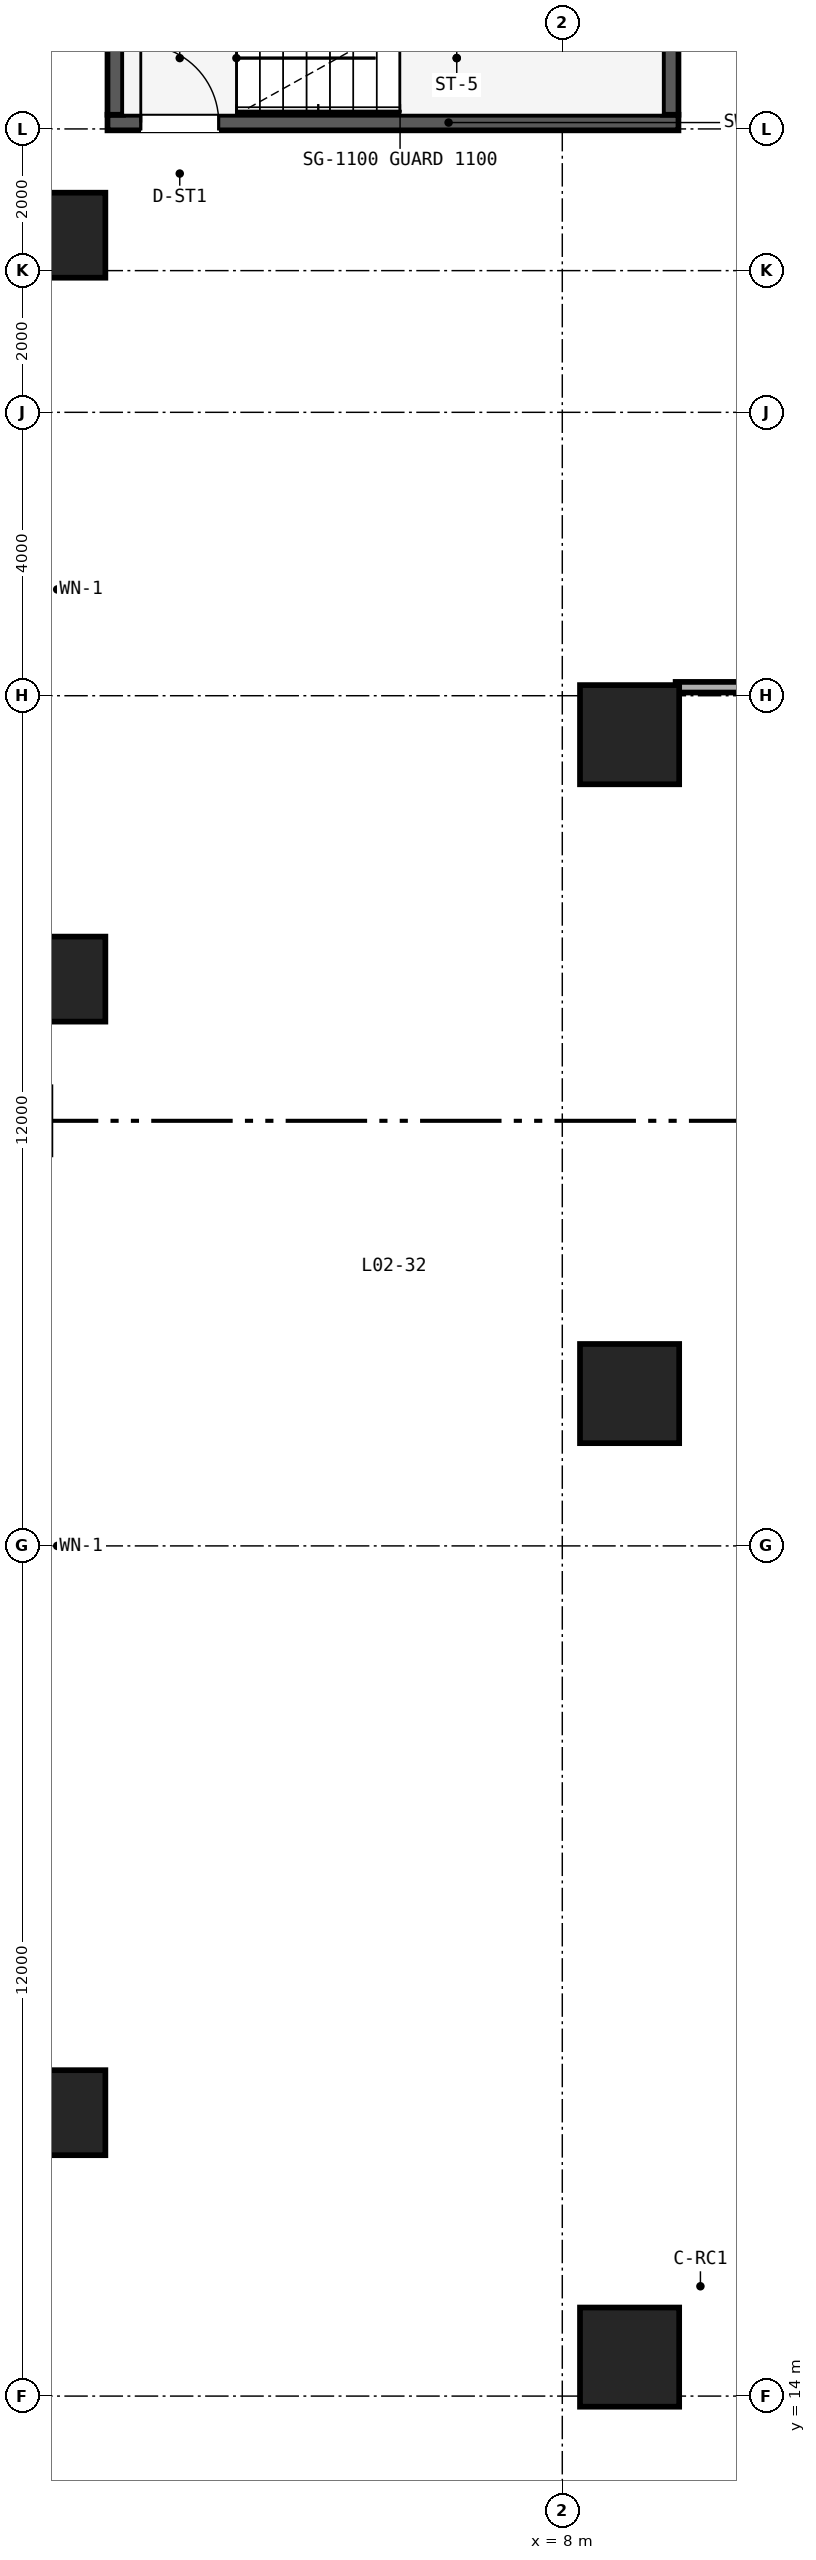
"""IFC4 building model, lengths in metres.
Left out: names, types, materials, properties, quantities, classifications, styles, units other than length and angle.
Written with IfcOpenShell. Run it as: python <this file> out.ifc"""

import sys

from ifc_helpers import new_model, si_unit, direction, frame, frame_2d, origin, origin_2d, place, context, subcontext, project, spatial, rectangle, extrude, source, transform, mapped, element, fill, save


model = new_model("IFC4")
c1 = context("Model", 3, precision=1e-05, world=origin(), true_north=direction((0.0, 1.0)))
c2 = subcontext(c1, "Body", "Model", "MODEL_VIEW")
j1 = project(units=[si_unit("LENGTHUNIT", "METRE"), si_unit("PLANEANGLEUNIT", "RADIAN")], contexts=[c1])
p1 = place(None, origin())
s1 = spatial("IfcSite", under=j1, at=p1, CompositionType="ELEMENT")
p2 = place(p1, origin())
s2 = spatial("IfcBuilding", under=s1, at=p2, CompositionType="ELEMENT")
p3 = place(p2, frame((0.0, 0.0, 6.0)))
s3 = spatial("IfcBuildingStorey", under=s2, at=p3, CompositionType="ELEMENT", Elevation=6.0)
p4 = place(p3, frame((1.58, 46.09, 0.0), z_axis=(0.0, 0.0, 1.0), x_axis=(1.0, 0.0, 0.0)))
e1 = element("IfcWall", 1, at=p4, inside=s3, PredefinedType="SHEAR", context=c2, shape_type="SweptSolid", body=[
    extrude(rectangle(XDim=8.06, YDim=0.22, at=frame_2d((4.03, 0.0))), origin(), (0.0, 0.0, 1.0), 5.2),
])
p5 = place(p4, frame((0.47, 0.0, 0.0)))
e2 = element("IfcOpeningElement", 2, at=p5, cuts=e1, PredefinedType="OPENING", context=c2, shape_type="SweptSolid", body=[
    extrude(rectangle(XDim=1.1, YDim=2.15, at=frame_2d((0.55, 1.075))), frame((0.0, 0.12, 0.0), z_axis=(0.0, -1.0, 0.0), x_axis=(1.0, 0.0, 0.0)), (0.0, 0.0, 1.0), 0.24),
])
for number, where, z_axis, x_axis in (
    (3, (1.69, 46.2, 0.0), (0.0, 0.0, 1.0), (0.0, 1.0, 0.0)),
    (4, (9.53, 46.2, 0.0), (0.0, 0.0, 1.0), (0.0, 1.0, 0.0)),
):
    element("IfcWall", number, at=place(p3, frame(where, z_axis=z_axis, x_axis=x_axis)), inside=s3, PredefinedType="SHEAR", context=c2, shape_type="SweptSolid", body=[
        extrude(rectangle(XDim=3.36, YDim=0.22, at=frame_2d((1.68, 0.0))), origin(), (0.0, 0.0, 1.0), 5.2),
    ])
m1 = source(origin(), c2, "Body", "SweptSolid", [
    extrude(rectangle(XDim=1.2, YDim=1.2, at=origin_2d()), origin(), (0.0, 0.0, 1.0), 5.08),
])
for number, where, z_axis, x_axis in (
    (5, (0.95, 18.0, 0.0), (0.0, 0.0, 1.0), (1.0, 0.0, 0.0)),
    (6, (0.95, 34.0, 0.0), (0.0, 0.0, 1.0), (1.0, 0.0, 0.0)),
    (7, (0.95, 44.5, 0.0), (0.0, 0.0, 1.0), (1.0, 0.0, 0.0)),
):
    element("IfcColumn", number, at=place(p3, frame(where, z_axis=z_axis, x_axis=x_axis)), inside=s3, PredefinedType="COLUMN", context=c2, shape_type="MappedRepresentation", body=[
        mapped(m1, transform((0.0, 0.0, 0.0), scale=1.0)),
    ])
m2 = source(origin(), c2, "Body", "SweptSolid", [
    extrude(rectangle(XDim=1.4, YDim=1.4, at=origin_2d()), origin(), (0.0, 0.0, 1.0), 5.08),
])
for number, where, z_axis, x_axis in (
    (8, (8.95, 14.55, 0.0), (0.0, 0.0, 1.0), (1.0, 0.0, 0.0)),
    (9, (8.95, 28.15, 0.0), (0.0, 0.0, 1.0), (1.0, 0.0, 0.0)),
    (10, (8.95, 37.45, 0.0), (0.0, 0.0, 1.0), (1.0, 0.0, 0.0)),
):
    element("IfcColumn", number, at=place(p3, frame(where, z_axis=z_axis, x_axis=x_axis)), inside=s3, PredefinedType="COLUMN", context=c2, shape_type="MappedRepresentation", body=[
        mapped(m2, transform((0.0, 0.0, 0.0), scale=1.0)),
    ])
p6 = place(p3, frame((9.6, 38.12, 0.0), z_axis=(0.0, 0.0, 1.0), x_axis=(1.0, 0.0, 0.0)))
e11 = element("IfcWall", 11, at=p6, inside=s3, PredefinedType="PARTITIONING", context=c2, shape_type="SweptSolid", body=[
    extrude(rectangle(XDim=14.28, YDim=0.15, at=frame_2d((7.14, 0.0))), origin(), (0.0, 0.0, 1.0), 4.301),
])
m3 = source(origin(), c2, "Body", "SweptSolid", [
    extrude(rectangle(XDim=1.1, YDim=2.15, at=frame_2d((0.55, 1.075))), frame((0.0, 0.025, 0.0), z_axis=(0.0, -1.0, 0.0), x_axis=(1.0, 0.0, 0.0)), (0.0, 0.0, 1.0), 0.05),
])
p7 = place(p5, origin())
e12 = element("IfcDoor", 12, at=p7, inside=s3, OperationType="SINGLE_SWING_LEFT", PredefinedType="DOOR", context=c2, shape_type="MappedRepresentation", body=[
    mapped(m3, transform((0.0, 0.0, 0.0), scale=1.0)),
])
fill(e2, e12)
save(model, sys.argv[1])
